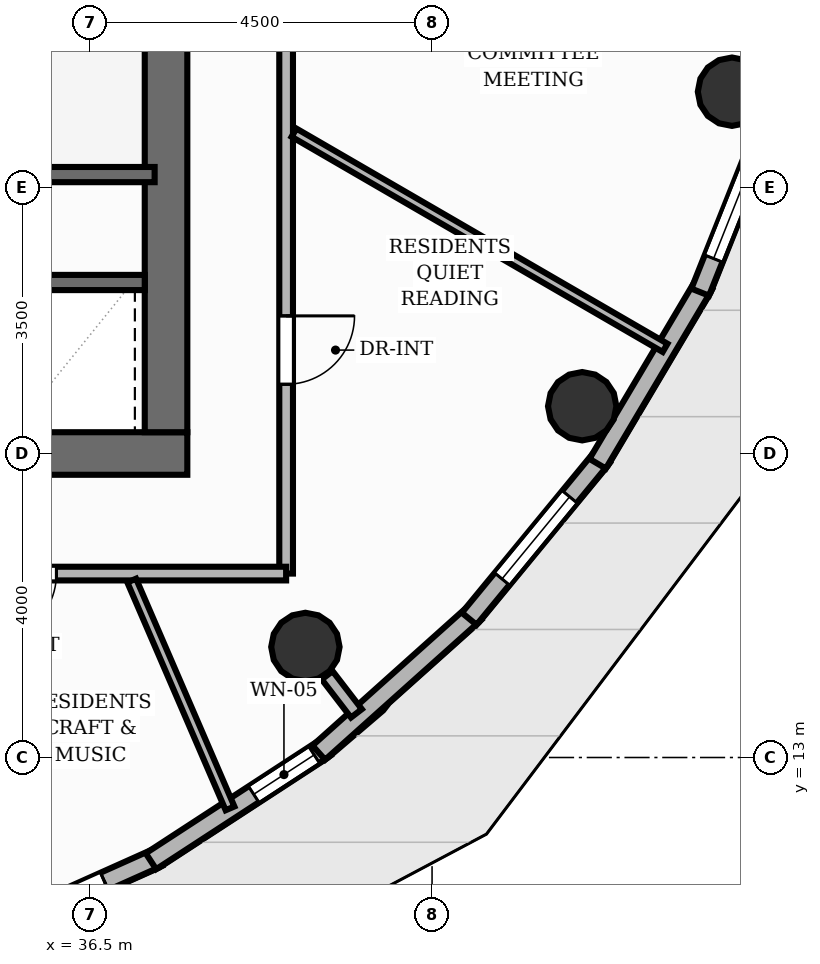
"""IFC4 building model, lengths in metres.
Left out: names, types, materials, properties, quantities, classifications, styles, units other than length and angle.
Written with IfcOpenShell. Run it as: python <this file> out.ifc"""

import sys

from ifc_helpers import new_model, si_unit, direction, frame, frame_2d, origin, origin_2d, place, context, subcontext, project, spatial, rectangle, circle, extrude, element, fill, save


model = new_model("IFC4")
c1 = context("Model", 3, precision=1e-05, world=origin(), true_north=direction((0.0, 1.0)))
c2 = subcontext(c1, "Body", "Model", "MODEL_VIEW")
j1 = project(units=[si_unit("LENGTHUNIT", "METRE"), si_unit("PLANEANGLEUNIT", "RADIAN")], contexts=[c1])
p1 = place(None, origin())
s1 = spatial("IfcSite", under=j1, at=p1, CompositionType="ELEMENT")
p2 = place(p1, origin())
s2 = spatial("IfcBuilding", under=s1, at=p2, CompositionType="ELEMENT")
p3 = place(p2, frame((0.0, 0.0, 188.64)))
s3 = spatial("IfcBuildingStorey", under=s2, at=p3, CompositionType="ELEMENT", Elevation=188.64)
p4 = place(p3, frame((26.22, 17.0, 0.0), z_axis=(0.0, 0.0, 1.0), x_axis=(1.0, 0.0, 0.0)))
e1 = element("IfcWall", 1, at=p4, inside=s3, PredefinedType="SHEAR", context=c2, shape_type="SweptSolid", body=[
    extrude(rectangle(XDim=11.56, YDim=0.56, at=frame_2d((5.78, 0.0))), origin(), (0.0, 0.0, 1.0), 3.2),
])
p5 = place(p4, frame((2.28, 0.0, 0.0)))
e2 = element("IfcOpeningElement", 2, at=p5, cuts=e1, PredefinedType="OPENING", context=c2, shape_type="SweptSolid", body=[
    extrude(rectangle(XDim=1.1, YDim=2.15, at=frame_2d((0.55, 1.075))), frame((0.0, 0.29, 0.0), z_axis=(0.0, -1.0, 0.0), x_axis=(1.0, 0.0, 0.0)), (0.0, 0.0, 1.0), 0.58),
])
p6 = place(p4, frame((5.83, 0.0, 0.0)))
e3 = element("IfcOpeningElement", 3, at=p6, cuts=e1, PredefinedType="OPENING", context=c2, shape_type="SweptSolid", body=[
    extrude(rectangle(XDim=0.9, YDim=2.1, at=frame_2d((0.45, 1.05))), frame((0.0, 0.29, 0.0), z_axis=(0.0, -1.0, 0.0), x_axis=(1.0, 0.0, 0.0)), (0.0, 0.0, 1.0), 0.58),
])
p7 = place(p3, frame((37.5, 17.28, 0.0), z_axis=(0.0, 0.0, 1.0), x_axis=(0.0, 1.0, 0.0)))
e4 = element("IfcWall", 4, at=p7, inside=s3, PredefinedType="SHEAR", context=c2, shape_type="SweptSolid", body=[
    extrude(rectangle(XDim=13.44, YDim=0.56, at=frame_2d((6.72, 0.0))), origin(), (0.0, 0.0, 1.0), 3.2),
])
for number, where, z_axis, x_axis in (
    (5, (39.333, 14.455, 0.0), (0.0, 0.0, 1.0), (1.0, 0.0, 0.0)),
    (6, (42.975, 17.622, 0.0), (0.0, 0.0, 1.0), (1.0, 0.0, 0.0)),
    (7, (44.946, 21.76, 0.0), (0.0, 0.0, 1.0), (1.0, 0.0, 0.0)),
):
    element("IfcColumn", number, at=place(p3, frame(where, z_axis=z_axis, x_axis=x_axis)), inside=s3, PredefinedType="COLUMN", context=c2, shape_type="SweptSolid", body=[
        extrude(circle(Radius=0.45, at=origin_2d()), origin(), (0.0, 0.0, 1.0), 3.2),
    ])
p8 = place(p3, frame((37.397, 11.687, 0.0), z_axis=(0.0, 0.0, 1.0), x_axis=(-0.912615139532, -0.408819773368, 0.0)))
e8 = element("IfcWall", 8, at=p8, inside=s3, PredefinedType="SOLIDWALL", context=c2, shape_type="SweptSolid", body=[
    extrude(rectangle(XDim=2.702, YDim=0.25, at=frame_2d((1.351, 0.0))), origin(), (0.0, 0.0, 1.0), 2.96),
])
p9 = place(p8, frame((0.776, 0.0, 0.0)))
e9 = element("IfcOpeningElement", 9, at=p9, cuts=e8, PredefinedType="OPENING", context=c2, shape_type="SweptSolid", body=[
    extrude(rectangle(XDim=1.15, YDim=2.2, at=frame_2d((0.575, 1.1))), frame((0.0, 0.135, 0.0), z_axis=(0.0, -1.0, 0.0), x_axis=(1.0, 0.0, 0.0)), (0.0, 0.0, 1.0), 0.27),
])
p10 = place(p3, frame((39.596, 13.13, 0.0), z_axis=(0.0, 0.0, 1.0), x_axis=(-0.837860586987, -0.545884270496, 0.0)))
e10 = element("IfcWall", 10, at=p10, inside=s3, PredefinedType="SOLIDWALL", context=c2, shape_type="SweptSolid", body=[
    extrude(rectangle(XDim=2.739, YDim=0.25, at=frame_2d((1.369, 0.0))), origin(), (0.0, 0.0, 1.0), 2.96),
])
p11 = place(p10, frame((0.175, 0.0, 0.85)))
e11 = element("IfcOpeningElement", 11, at=p11, cuts=e10, PredefinedType="OPENING", context=c2, shape_type="SweptSolid", body=[
    extrude(rectangle(XDim=0.95, YDim=1.45, at=frame_2d((0.475, 0.725))), frame((0.0, 0.135, 0.0), z_axis=(0.0, -1.0, 0.0), x_axis=(1.0, 0.0, 0.0)), (0.0, 0.0, 1.0), 0.27),
])
p12 = place(p3, frame((41.564, 14.904, 0.0), z_axis=(0.0, 0.0, 1.0), x_axis=(-0.744898573364, -0.667177723998, 0.0)))
e12 = element("IfcWall", 12, at=p12, inside=s3, PredefinedType="SOLIDWALL", context=c2, shape_type="SweptSolid", body=[
    extrude(rectangle(XDim=2.758, YDim=0.25, at=frame_2d((1.379, 0.0))), origin(), (0.0, 0.0, 1.0), 2.96),
])
p13 = place(p3, frame((43.241, 16.955, 0.0), z_axis=(0.0, 0.0, 1.0), x_axis=(-0.635409334306, -0.772175483861, 0.0)))
e13 = element("IfcWall", 13, at=p13, inside=s3, PredefinedType="SOLIDWALL", context=c2, shape_type="SweptSolid", body=[
    extrude(rectangle(XDim=2.758, YDim=0.25, at=frame_2d((1.379, 0.0))), origin(), (0.0, 0.0, 1.0), 2.96),
])
p14 = place(p13, frame((0.679, 0.0, 0.85)))
e14 = element("IfcOpeningElement", 14, at=p14, cuts=e13, PredefinedType="OPENING", context=c2, shape_type="SweptSolid", body=[
    extrude(rectangle(XDim=1.4, YDim=1.55, at=frame_2d((0.7, 0.775))), frame((0.0, 0.135, 0.0), z_axis=(0.0, -1.0, 0.0), x_axis=(1.0, 0.0, 0.0)), (0.0, 0.0, 1.0), 0.27),
])
p15 = place(p3, frame((44.576, 19.221, 0.0), z_axis=(0.0, 0.0, 1.0), x_axis=(-0.510320389621, -0.859984360287, 0.0)))
e15 = element("IfcWall", 15, at=p15, inside=s3, PredefinedType="SOLIDWALL", context=c2, shape_type="SweptSolid", body=[
    extrude(rectangle(XDim=2.738, YDim=0.25, at=frame_2d((1.369, 0.0))), origin(), (0.0, 0.0, 1.0), 2.96),
])
p16 = place(p3, frame((45.528, 21.633, 0.0), z_axis=(0.0, 0.0, 1.0), x_axis=(-0.370330939431, -0.928899884433, 0.0)))
e16 = element("IfcWall", 16, at=p16, inside=s3, PredefinedType="SOLIDWALL", context=c2, shape_type="SweptSolid", body=[
    extrude(rectangle(XDim=2.702, YDim=0.25, at=frame_2d((1.351, 0.0))), origin(), (0.0, 0.0, 1.0), 2.96),
])
p17 = place(p16, frame((0.576, 0.0, 0.85)))
e17 = element("IfcOpeningElement", 17, at=p17, cuts=e16, PredefinedType="OPENING", context=c2, shape_type="SweptSolid", body=[
    extrude(rectangle(XDim=1.65, YDim=1.55, at=frame_2d((0.825, 0.775))), frame((0.0, 0.135, 0.0), z_axis=(0.0, -1.0, 0.0), x_axis=(1.0, 0.0, 0.0)), (0.0, 0.0, 1.0), 0.27),
])
p18 = place(p3, frame((34.11, 20.67, 0.0), z_axis=(0.0, 0.0, 1.0), x_axis=(1.0, 0.0, 0.0)))
e18 = element("IfcWall", 18, at=p18, inside=s3, PredefinedType="SHEAR", context=c2, shape_type="SweptSolid", body=[
    extrude(rectangle(XDim=3.24, YDim=0.2, at=frame_2d((1.62, 0.0))), origin(), (0.0, 0.0, 1.0), 3.2),
])
p19 = place(p3, frame((33.5, 19.25, 0.0), z_axis=(0.0, 0.0, 1.0), x_axis=(1.0, 0.0, 0.0)))
e19 = element("IfcWall", 19, at=p19, inside=s3, PredefinedType="SHEAR", context=c2, shape_type="SweptSolid", body=[
    extrude(rectangle(XDim=3.72, YDim=0.2, at=frame_2d((1.86, 0.0))), origin(), (0.0, 0.0, 1.0), 3.2),
])
p20 = place(p3, frame((39.62, 14.082, 0.0), z_axis=(0.0, 0.0, 1.0), x_axis=(0.609112888366, -0.793083532314, 0.0)))
e20 = element("IfcWall", 20, at=p20, inside=s3, PredefinedType="PARTITIONING", context=c2, shape_type="SweptSolid", body=[
    extrude(rectangle(XDim=0.632, YDim=0.18, at=frame_2d((0.316, 0.0))), origin(), (0.0, 0.0, 1.0), 2.404),
])
p21 = place(p3, frame((39.08, 24.526, 0.0), z_axis=(0.0, 0.0, 1.0), x_axis=(0.0, -1.0, 0.0)))
e21 = element("IfcWall", 21, at=p21, inside=s3, PredefinedType="PARTITIONING", context=c2, shape_type="SweptSolid", body=[
    extrude(rectangle(XDim=9.106, YDim=0.18, at=frame_2d((4.553, 0.0))), origin(), (0.0, 0.0, 1.0), 2.955),
])
p22 = place(p21, frame((1.184, 0.0, 0.0)))
e22 = element("IfcOpeningElement", 22, at=p22, cuts=e21, PredefinedType="OPENING", context=c2, shape_type="SweptSolid", body=[
    extrude(rectangle(XDim=0.9, YDim=2.1, at=frame_2d((0.45, 1.05))), frame((0.0, 0.1, 0.0), z_axis=(0.0, -1.0, 0.0), x_axis=(1.0, 0.0, 0.0)), (0.0, 0.0, 1.0), 0.2),
])
p23 = place(p21, frame((5.716, 0.0, 0.0)))
e23 = element("IfcOpeningElement", 23, at=p23, cuts=e21, PredefinedType="OPENING", context=c2, shape_type="SweptSolid", body=[
    extrude(rectangle(XDim=0.9, YDim=2.1, at=frame_2d((0.45, 1.05))), frame((0.0, 0.1, 0.0), z_axis=(0.0, -1.0, 0.0), x_axis=(1.0, 0.0, 0.0)), (0.0, 0.0, 1.0), 0.2),
])
p24 = place(p3, frame((39.08, 15.42, 0.0), z_axis=(0.0, 0.0, 1.0), x_axis=(-1.0, 0.0, 0.0)))
e24 = element("IfcWall", 24, at=p24, inside=s3, PredefinedType="PARTITIONING", context=c2, shape_type="SweptSolid", body=[
    extrude(rectangle(XDim=10.594, YDim=0.18, at=frame_2d((5.297, 0.0))), origin(), (0.0, 0.0, 1.0), 2.955),
])
p25 = place(p24, frame((3.021, 0.0, 0.0)))
e25 = element("IfcOpeningElement", 25, at=p25, cuts=e24, PredefinedType="OPENING", context=c2, shape_type="SweptSolid", body=[
    extrude(rectangle(XDim=0.9, YDim=2.1, at=frame_2d((0.45, 1.05))), frame((0.0, 0.1, 0.0), z_axis=(0.0, -1.0, 0.0), x_axis=(1.0, 0.0, 0.0)), (0.0, 0.0, 1.0), 0.2),
])
p26 = place(p24, frame((6.508, 0.0, 0.0)))
e26 = element("IfcOpeningElement", 26, at=p26, cuts=e24, PredefinedType="OPENING", context=c2, shape_type="SweptSolid", body=[
    extrude(rectangle(XDim=0.9, YDim=2.1, at=frame_2d((0.45, 1.05))), frame((0.0, 0.1, 0.0), z_axis=(0.0, -1.0, 0.0), x_axis=(1.0, 0.0, 0.0)), (0.0, 0.0, 1.0), 0.2),
])
p27 = place(p3, frame((44.066, 18.39, 0.0), z_axis=(0.0, 0.0, 1.0), x_axis=(-0.865092390625, 0.501612555348, 0.0)))
e27 = element("IfcWall", 27, at=p27, inside=s3, PredefinedType="PARTITIONING", context=c2, shape_type="SweptSolid", body=[
    extrude(rectangle(XDim=5.643, YDim=0.125, at=frame_2d((2.822, 0.0))), origin(), (0.0, 0.0, 1.0), 2.692),
])
p28 = place(p3, frame((38.342, 12.331, 0.0), z_axis=(0.0, 0.0, 1.0), x_axis=(-0.396192482216, 0.918167477662, 0.0)))
e28 = element("IfcWall", 28, at=p28, inside=s3, PredefinedType="PARTITIONING", context=c2, shape_type="SweptSolid", body=[
    extrude(rectangle(XDim=3.265, YDim=0.125, at=frame_2d((1.632, 0.0))), origin(), (0.0, 0.0, 1.0), 2.692),
])
p29 = place(p9, origin())
e29 = element("IfcDoor", 29, at=p29, inside=s3, OperationType="SINGLE_SWING_LEFT", PredefinedType="DOOR", context=c2, shape_type="SweptSolid", body=[
    extrude(rectangle(XDim=1.15, YDim=2.2, at=frame_2d((0.575, 1.1))), frame((0.0, 0.025, 0.0), z_axis=(0.0, -1.0, 0.0), x_axis=(1.0, 0.0, 0.0)), (0.0, 0.0, 1.0), 0.05),
])
fill(e9, e29)
p30 = place(p11, origin())
e30 = element("IfcWindow", 30, at=p30, inside=s3, PartitioningType="SINGLE_PANEL", PredefinedType="WINDOW", context=c2, shape_type="SweptSolid", body=[
    extrude(rectangle(XDim=0.95, YDim=1.45, at=frame_2d((0.475, 0.725))), frame((0.0, 0.03, 0.0), z_axis=(0.0, -1.0, 0.0), x_axis=(1.0, 0.0, 0.0)), (0.0, 0.0, 1.0), 0.06),
])
fill(e11, e30)
p31 = place(p14, origin())
e31 = element("IfcWindow", 31, at=p31, inside=s3, PartitioningType="SINGLE_PANEL", PredefinedType="WINDOW", context=c2, shape_type="SweptSolid", body=[
    extrude(rectangle(XDim=1.4, YDim=1.55, at=frame_2d((0.7, 0.775))), frame((0.0, 0.03, 0.0), z_axis=(0.0, -1.0, 0.0), x_axis=(1.0, 0.0, 0.0)), (0.0, 0.0, 1.0), 0.06),
])
fill(e14, e31)
p32 = place(p17, origin())
e32 = element("IfcWindow", 32, at=p32, inside=s3, PartitioningType="SINGLE_PANEL", PredefinedType="WINDOW", context=c2, shape_type="SweptSolid", body=[
    extrude(rectangle(XDim=1.65, YDim=1.55, at=frame_2d((0.825, 0.775))), frame((0.0, 0.03, 0.0), z_axis=(0.0, -1.0, 0.0), x_axis=(1.0, 0.0, 0.0)), (0.0, 0.0, 1.0), 0.06),
])
fill(e17, e32)
p33 = place(p23, origin())
e33 = element("IfcDoor", 33, at=p33, inside=s3, OperationType="SINGLE_SWING_LEFT", PredefinedType="DOOR", context=c2, shape_type="SweptSolid", body=[
    extrude(rectangle(XDim=0.9, YDim=2.1, at=frame_2d((0.45, 1.05))), frame((0.0, 0.025, 0.0), z_axis=(0.0, -1.0, 0.0), x_axis=(1.0, 0.0, 0.0)), (0.0, 0.0, 1.0), 0.05),
])
fill(e23, e33)
p34 = place(p25, origin())
e34 = element("IfcDoor", 34, at=p34, inside=s3, OperationType="SINGLE_SWING_RIGHT", PredefinedType="DOOR", context=c2, shape_type="SweptSolid", body=[
    extrude(rectangle(XDim=0.9, YDim=2.1, at=frame_2d((0.45, 1.05))), frame((0.0, 0.025, 0.0), z_axis=(0.0, -1.0, 0.0), x_axis=(1.0, 0.0, 0.0)), (0.0, 0.0, 1.0), 0.05),
])
fill(e25, e34)
save(model, sys.argv[1])
